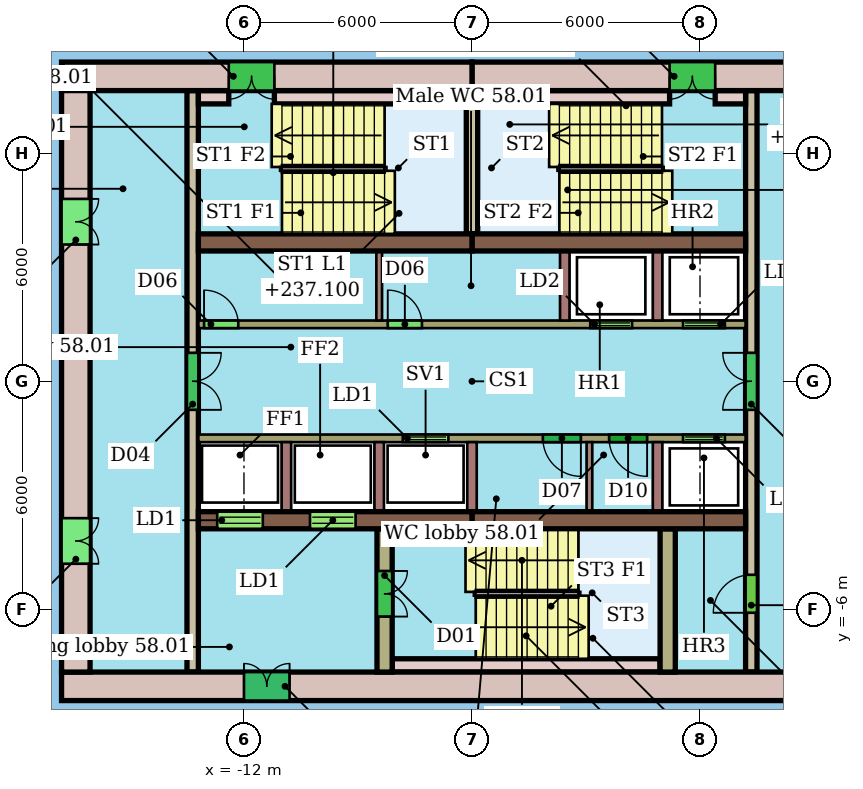
"""IFC4 building model, lengths in metres.
Left out: names, types, materials, properties, quantities, classifications, styles, units other than length and angle.
Written with IfcOpenShell. Run it as: python <this file> out.ifc"""

import sys

from ifc_helpers import new_model, si_unit, direction, frame, frame_2d, origin, place, context, subcontext, project, spatial, rectangle, extrude, element, fill, save


model = new_model("IFC4")
c1 = context("Model", 3, precision=1e-05, world=origin(), true_north=direction((0.0, 1.0)))
c2 = subcontext(c1, "Body", "Model", "MODEL_VIEW")
j1 = project(units=[si_unit("LENGTHUNIT", "METRE"), si_unit("PLANEANGLEUNIT", "RADIAN")], contexts=[c1])
p1 = place(None, origin())
s1 = spatial("IfcSite", under=j1, at=p1, CompositionType="ELEMENT")
p2 = place(p1, origin())
s2 = spatial("IfcBuilding", under=s1, at=p2, CompositionType="ELEMENT")
p3 = place(p2, frame((0.0, 0.0, 235.3)))
s3 = spatial("IfcBuildingStorey", under=s2, at=p3, CompositionType="ELEMENT", Elevation=235.3)
p4 = place(p3, frame((4.8, 8.025, 0.0), z_axis=(0.0, 0.0, 1.0), x_axis=(-1.0, 0.0, 0.0)))
e1 = element("IfcWall", 1, at=p4, inside=s3, PredefinedType="SHEAR", context=c2, shape_type="SweptSolid", body=[
    extrude(rectangle(XDim=10.8, YDim=0.75, at=frame_2d((5.4, 0.0))), origin(), (0.0, 0.0, 1.0), 3.3),
])
p5 = place(p4, frame((4.4, 0.0, 0.0)))
e2 = element("IfcOpeningElement", 2, at=p5, cuts=e1, PredefinedType="OPENING", context=c2, shape_type="SweptSolid", body=[
    extrude(rectangle(XDim=1.2, YDim=2.1, at=frame_2d((0.6, 1.05))), frame((0.0, 0.385, 0.0), z_axis=(0.0, -1.0, 0.0), x_axis=(1.0, 0.0, 0.0)), (0.0, 0.0, 1.0), 0.77),
])
p6 = place(p3, frame((-6.0, 8.025, 0.0), z_axis=(0.0, 0.0, 1.0), x_axis=(-1.0, 0.0, 0.0)))
e3 = element("IfcWall", 3, at=p6, inside=s3, PredefinedType="SHEAR", context=c2, shape_type="SweptSolid", body=[
    extrude(rectangle(XDim=10.8, YDim=0.75, at=frame_2d((5.4, 0.0))), origin(), (0.0, 0.0, 1.0), 3.3),
])
p7 = place(p6, frame((5.2, 0.0, 0.0)))
e4 = element("IfcOpeningElement", 4, at=p7, cuts=e3, PredefinedType="OPENING", context=c2, shape_type="SweptSolid", body=[
    extrude(rectangle(XDim=1.2, YDim=2.1, at=frame_2d((0.6, 1.05))), frame((0.0, 0.385, 0.0), z_axis=(0.0, -1.0, 0.0), x_axis=(1.0, 0.0, 0.0)), (0.0, 0.0, 1.0), 0.77),
])
p8 = place(p3, frame((-16.8, -8.025, 0.0), z_axis=(0.0, 0.0, 1.0), x_axis=(1.0, 0.0, 0.0)))
e5 = element("IfcWall", 5, at=p8, inside=s3, PredefinedType="SHEAR", context=c2, shape_type="SweptSolid", body=[
    extrude(rectangle(XDim=21.6, YDim=0.75, at=frame_2d((10.8, 0.0))), origin(), (0.0, 0.0, 1.0), 3.3),
])
p9 = place(p8, frame((4.8, 0.0, 0.0)))
e6 = element("IfcOpeningElement", 6, at=p9, cuts=e5, PredefinedType="OPENING", context=c2, shape_type="SweptSolid", body=[
    extrude(rectangle(XDim=1.2, YDim=2.1, at=frame_2d((0.6, 1.05))), frame((0.0, 0.385, 0.0), z_axis=(0.0, -1.0, 0.0), x_axis=(1.0, 0.0, 0.0)), (0.0, 0.0, 1.0), 0.77),
])
p10 = place(p3, frame((-16.425, 7.65, 0.0), z_axis=(0.0, 0.0, 1.0), x_axis=(0.0, -1.0, 0.0)))
e7 = element("IfcWall", 7, at=p10, inside=s3, PredefinedType="SHEAR", context=c2, shape_type="SweptSolid", body=[
    extrude(rectangle(XDim=15.3, YDim=0.75, at=frame_2d((7.65, 0.0))), origin(), (0.0, 0.0, 1.0), 3.3),
])
p11 = place(p10, frame((11.25, 0.0, 0.0)))
e8 = element("IfcOpeningElement", 8, at=p11, cuts=e7, PredefinedType="OPENING", context=c2, shape_type="SweptSolid", body=[
    extrude(rectangle(XDim=1.2, YDim=2.1, at=frame_2d((0.6, 1.05))), frame((0.0, 0.385, 0.0), z_axis=(0.0, -1.0, 0.0), x_axis=(1.0, 0.0, 0.0)), (0.0, 0.0, 1.0), 0.77),
])
p12 = place(p10, frame((2.85, 0.0, 0.0)))
e9 = element("IfcOpeningElement", 9, at=p12, cuts=e7, PredefinedType="OPENING", context=c2, shape_type="SweptSolid", body=[
    extrude(rectangle(XDim=1.2, YDim=2.1, at=frame_2d((0.6, 1.05))), frame((0.0, 0.385, 0.0), z_axis=(0.0, -1.0, 0.0), x_axis=(1.0, 0.0, 0.0)), (0.0, 0.0, 1.0), 0.77),
])
for number, where, z_axis, x_axis in (
    (10, (-13.2, 3.655, 0.0), (0.0, 0.0, 1.0), (1.0, 0.0, 0.0)),
    (11, (-6.0, 3.655, 0.0), (0.0, 0.0, 1.0), (1.0, 0.0, 0.0)),
):
    element("IfcWall", number, at=place(p3, frame(where, z_axis=z_axis, x_axis=x_axis)), inside=s3, PredefinedType="SHEAR", context=c2, shape_type="SweptSolid", body=[
        extrude(rectangle(XDim=7.2, YDim=0.45, at=frame_2d((3.6, 0.0))), origin(), (0.0, 0.0, 1.0), 3.3),
    ])
p13 = place(p3, frame((-13.2, -3.655, 0.0), z_axis=(0.0, 0.0, 1.0), x_axis=(1.0, 0.0, 0.0)))
e12 = element("IfcWall", 12, at=p13, inside=s3, PredefinedType="SHEAR", context=c2, shape_type="SweptSolid", body=[
    extrude(rectangle(XDim=7.2, YDim=0.45, at=frame_2d((3.6, 0.0))), origin(), (0.0, 0.0, 1.0), 3.3),
])
p14 = place(p13, frame((0.496, 0.0, 0.0)))
e13 = element("IfcOpeningElement", 13, at=p14, cuts=e12, PredefinedType="OPENING", context=c2, shape_type="SweptSolid", body=[
    extrude(rectangle(XDim=1.2, YDim=2.1, at=frame_2d((0.6, 1.05))), frame((0.0, 0.235, 0.0), z_axis=(0.0, -1.0, 0.0), x_axis=(1.0, 0.0, 0.0)), (0.0, 0.0, 1.0), 0.47),
])
p15 = place(p13, frame((2.938, 0.0, 0.0)))
e14 = element("IfcOpeningElement", 14, at=p15, cuts=e12, PredefinedType="OPENING", context=c2, shape_type="SweptSolid", body=[
    extrude(rectangle(XDim=1.2, YDim=2.1, at=frame_2d((0.6, 1.05))), frame((0.0, 0.235, 0.0), z_axis=(0.0, -1.0, 0.0), x_axis=(1.0, 0.0, 0.0)), (0.0, 0.0, 1.0), 0.47),
])
p16 = place(p3, frame((-6.0, -3.655, 0.0), z_axis=(0.0, 0.0, 1.0), x_axis=(1.0, 0.0, 0.0)))
e15 = element("IfcWall", 15, at=p16, inside=s3, PredefinedType="SHEAR", context=c2, shape_type="SweptSolid", body=[
    extrude(rectangle(XDim=7.2, YDim=0.45, at=frame_2d((3.6, 0.0))), origin(), (0.0, 0.0, 1.0), 3.3),
])
p17 = place(p3, frame((-13.35, 7.65, 0.0), z_axis=(0.0, 0.0, 1.0), x_axis=(0.0, -1.0, 0.0)))
e16 = element("IfcWall", 16, at=p17, inside=s3, PredefinedType="SHEAR", context=c2, shape_type="SweptSolid", body=[
    extrude(rectangle(XDim=15.3, YDim=0.3, at=frame_2d((7.65, 0.0))), origin(), (0.0, 0.0, 1.0), 3.3),
])
p18 = place(p17, frame((6.9, 0.0, 0.0)))
e17 = element("IfcOpeningElement", 17, at=p18, cuts=e16, PredefinedType="OPENING", context=c2, shape_type="SweptSolid", body=[
    extrude(rectangle(XDim=1.5, YDim=2.1, at=frame_2d((0.75, 1.05))), frame((0.0, 0.16, 0.0), z_axis=(0.0, -1.0, 0.0), x_axis=(1.0, 0.0, 0.0)), (0.0, 0.0, 1.0), 0.32),
])
p19 = place(p3, frame((1.35, -7.65, 0.0), z_axis=(0.0, 0.0, 1.0), x_axis=(0.0, 1.0, 0.0)))
e18 = element("IfcWall", 18, at=p19, inside=s3, PredefinedType="SHEAR", context=c2, shape_type="SweptSolid", body=[
    extrude(rectangle(XDim=15.3, YDim=0.3, at=frame_2d((7.65, 0.0))), origin(), (0.0, 0.0, 1.0), 3.3),
])
p20 = place(p19, frame((1.56, 0.0, 0.0)))
e19 = element("IfcOpeningElement", 19, at=p20, cuts=e18, PredefinedType="OPENING", context=c2, shape_type="SweptSolid", body=[
    extrude(rectangle(XDim=1.0, YDim=2.1, at=frame_2d((0.5, 1.05))), frame((0.0, 0.16, 0.0), z_axis=(0.0, -1.0, 0.0), x_axis=(1.0, 0.0, 0.0)), (0.0, 0.0, 1.0), 0.32),
])
p21 = place(p19, frame((6.9, 0.0, 0.0)))
e20 = element("IfcOpeningElement", 20, at=p21, cuts=e18, PredefinedType="OPENING", context=c2, shape_type="SweptSolid", body=[
    extrude(rectangle(XDim=1.5, YDim=2.1, at=frame_2d((0.75, 1.05))), frame((0.0, 0.16, 0.0), z_axis=(0.0, -1.0, 0.0), x_axis=(1.0, 0.0, 0.0)), (0.0, 0.0, 1.0), 0.32),
])
p22 = place(p3, frame((-13.2, 1.5, 0.0), z_axis=(0.0, 0.0, 1.0), x_axis=(1.0, 0.0, 0.0)))
e21 = element("IfcWall", 21, at=p22, inside=s3, PredefinedType="SHEAR", context=c2, shape_type="SweptSolid", body=[
    extrude(rectangle(XDim=14.4, YDim=0.2, at=frame_2d((7.2, 0.0))), origin(), (0.0, 0.0, 1.0), 3.3),
])
p23 = place(p22, frame((10.312, 0.0, 0.0)))
e22 = element("IfcOpeningElement", 22, at=p23, cuts=e21, PredefinedType="OPENING", context=c2, shape_type="SweptSolid", body=[
    extrude(rectangle(XDim=1.1, YDim=2.1, at=frame_2d((0.55, 1.05))), frame((0.0, 0.11, 0.0), z_axis=(0.0, -1.0, 0.0), x_axis=(1.0, 0.0, 0.0)), (0.0, 0.0, 1.0), 0.22),
])
p24 = place(p22, frame((12.754, 0.0, 0.0)))
e23 = element("IfcOpeningElement", 23, at=p24, cuts=e21, PredefinedType="OPENING", context=c2, shape_type="SweptSolid", body=[
    extrude(rectangle(XDim=1.1, YDim=2.1, at=frame_2d((0.55, 1.05))), frame((0.0, 0.11, 0.0), z_axis=(0.0, -1.0, 0.0), x_axis=(1.0, 0.0, 0.0)), (0.0, 0.0, 1.0), 0.22),
])
p25 = place(p22, frame((0.15, 0.0, 0.0)))
e24 = element("IfcOpeningElement", 24, at=p25, cuts=e21, PredefinedType="OPENING", context=c2, shape_type="SweptSolid", body=[
    extrude(rectangle(XDim=0.9, YDim=2.1, at=frame_2d((0.45, 1.05))), frame((0.0, 0.11, 0.0), z_axis=(0.0, -1.0, 0.0), x_axis=(1.0, 0.0, 0.0)), (0.0, 0.0, 1.0), 0.22),
])
p26 = place(p22, frame((4.983, 0.0, 0.0)))
e25 = element("IfcOpeningElement", 25, at=p26, cuts=e21, PredefinedType="OPENING", context=c2, shape_type="SweptSolid", body=[
    extrude(rectangle(XDim=0.9, YDim=2.1, at=frame_2d((0.45, 1.05))), frame((0.0, 0.11, 0.0), z_axis=(0.0, -1.0, 0.0), x_axis=(1.0, 0.0, 0.0)), (0.0, 0.0, 1.0), 0.22),
])
p27 = place(p3, frame((1.2, -1.5, 0.0), z_axis=(0.0, 0.0, 1.0), x_axis=(-1.0, 0.0, 0.0)))
e26 = element("IfcWall", 26, at=p27, inside=s3, PredefinedType="SHEAR", context=c2, shape_type="SweptSolid", body=[
    extrude(rectangle(XDim=14.4, YDim=0.2, at=frame_2d((7.2, 0.0))), origin(), (0.0, 0.0, 1.0), 3.3),
])
p28 = place(p27, frame((7.821, 0.0, 0.0)))
e27 = element("IfcOpeningElement", 27, at=p28, cuts=e26, PredefinedType="OPENING", context=c2, shape_type="SweptSolid", body=[
    extrude(rectangle(XDim=1.2, YDim=2.1, at=frame_2d((0.6, 1.05))), frame((0.0, 0.11, 0.0), z_axis=(0.0, -1.0, 0.0), x_axis=(1.0, 0.0, 0.0)), (0.0, 0.0, 1.0), 0.22),
])
p29 = place(p27, frame((0.546, 0.0, 0.0)))
e28 = element("IfcOpeningElement", 28, at=p29, cuts=e26, PredefinedType="OPENING", context=c2, shape_type="SweptSolid", body=[
    extrude(rectangle(XDim=1.1, YDim=2.1, at=frame_2d((0.55, 1.05))), frame((0.0, 0.11, 0.0), z_axis=(0.0, -1.0, 0.0), x_axis=(1.0, 0.0, 0.0)), (0.0, 0.0, 1.0), 0.22),
])
p30 = place(p27, frame((4.335, 0.0, 0.0)))
e29 = element("IfcOpeningElement", 29, at=p30, cuts=e26, PredefinedType="OPENING", context=c2, shape_type="SweptSolid", body=[
    extrude(rectangle(XDim=1.0, YDim=2.1, at=frame_2d((0.5, 1.05))), frame((0.0, 0.11, 0.0), z_axis=(0.0, -1.0, 0.0), x_axis=(1.0, 0.0, 0.0)), (0.0, 0.0, 1.0), 0.22),
])
p31 = place(p27, frame((2.592, 0.0, 0.0)))
e30 = element("IfcOpeningElement", 30, at=p31, cuts=e26, PredefinedType="OPENING", context=c2, shape_type="SweptSolid", body=[
    extrude(rectangle(XDim=1.0, YDim=2.1, at=frame_2d((0.5, 1.05))), frame((0.0, 0.11, 0.0), z_axis=(0.0, -1.0, 0.0), x_axis=(1.0, 0.0, 0.0)), (0.0, 0.0, 1.0), 0.22),
])
p32 = place(p3, frame((-8.3, -3.88, 0.0), z_axis=(0.0, 0.0, 1.0), x_axis=(0.0, -1.0, 0.0)))
e31 = element("IfcWall", 31, at=p32, inside=s3, PredefinedType="SHEAR", context=c2, shape_type="SweptSolid", body=[
    extrude(rectangle(XDim=3.77, YDim=0.4, at=frame_2d((1.885, 0.0))), origin(), (0.0, 0.0, 1.0), 3.3),
])
p33 = place(p32, frame((1.11, 0.0, 0.0)))
e32 = element("IfcOpeningElement", 32, at=p33, cuts=e31, PredefinedType="OPENING", context=c2, shape_type="SweptSolid", body=[
    extrude(rectangle(XDim=1.2, YDim=2.1, at=frame_2d((0.6, 1.05))), frame((0.0, 0.21, 0.0), z_axis=(0.0, -1.0, 0.0), x_axis=(1.0, 0.0, 0.0)), (0.0, 0.0, 1.0), 0.42),
])
p34 = place(p3, frame((-0.85, -3.88, 0.0), z_axis=(0.0, 0.0, 1.0), x_axis=(0.0, -1.0, 0.0)))
e33 = element("IfcWall", 33, at=p34, inside=s3, PredefinedType="SHEAR", context=c2, shape_type="SweptSolid", body=[
    extrude(rectangle(XDim=3.77, YDim=0.4, at=frame_2d((1.885, 0.0))), origin(), (0.0, 0.0, 1.0), 3.3),
])
p35 = place(p3, frame((-6.0, 3.88, 0.0), z_axis=(0.0, 0.0, 1.0), x_axis=(0.0, 1.0, 0.0)))
e34 = element("IfcWall", 34, at=p35, inside=s3, PredefinedType="SHEAR", context=c2, shape_type="SweptSolid", body=[
    extrude(rectangle(XDim=3.77, YDim=0.3, at=frame_2d((1.885, 0.0))), origin(), (0.0, 0.0, 1.0), 3.3),
])
p36 = place(p3, frame((-13.2, 7.475, 0.0), z_axis=(0.0, 0.0, 1.0), x_axis=(1.0, 0.0, 0.0)))
e35 = element("IfcWall", 35, at=p36, inside=s3, PredefinedType="SHEAR", context=c2, shape_type="SweptSolid", body=[
    extrude(rectangle(XDim=0.8, YDim=0.35, at=frame_2d((0.4, 0.0))), origin(), (0.0, 0.0, 1.0), 3.3),
])
for number, where, z_axis, x_axis in (
    (36, (-11.2, 7.475, 0.0), (0.0, 0.0, 1.0), (1.0, 0.0, 0.0)),
    (37, (-5.85, 7.475, 0.0), (0.0, 0.0, 1.0), (1.0, 0.0, 0.0)),
):
    element("IfcWall", number, at=place(p3, frame(where, z_axis=z_axis, x_axis=x_axis)), inside=s3, PredefinedType="SHEAR", context=c2, shape_type="SweptSolid", body=[
        extrude(rectangle(XDim=5.05, YDim=0.35, at=frame_2d((2.525, 0.0))), origin(), (0.0, 0.0, 1.0), 3.3),
    ])
p37 = place(p3, frame((0.4, 7.475, 0.0), z_axis=(0.0, 0.0, 1.0), x_axis=(1.0, 0.0, 0.0)))
e38 = element("IfcWall", 38, at=p37, inside=s3, PredefinedType="SHEAR", context=c2, shape_type="SweptSolid", body=[
    extrude(rectangle(XDim=0.8, YDim=0.35, at=frame_2d((0.4, 0.0))), origin(), (0.0, 0.0, 1.0), 3.3),
])
p38 = place(p3, frame((-8.1, -7.475, 0.0), z_axis=(0.0, 0.0, 1.0), x_axis=(1.0, 0.0, 0.0)))
e39 = element("IfcWall", 39, at=p38, inside=s3, PredefinedType="SHEAR", context=c2, shape_type="SweptSolid", body=[
    extrude(rectangle(XDim=7.05, YDim=0.35, at=frame_2d((3.525, 0.0))), origin(), (0.0, 0.0, 1.0), 3.3),
])
for number, where, z_axis, x_axis in (
    (40, (-3.558, 1.6, 0.0), (0.0, 0.0, 1.0), (0.0, 1.0, 0.0)),
    (41, (-1.117, 1.6, 0.0), (0.0, 0.0, 1.0), (0.0, 1.0, 0.0)),
):
    element("IfcWall", number, at=place(p3, frame(where, z_axis=z_axis, x_axis=x_axis)), inside=s3, PredefinedType="SHEAR", context=c2, shape_type="SweptSolid", body=[
        extrude(rectangle(XDim=1.83, YDim=0.25, at=frame_2d((0.915, 0.0))), origin(), (0.0, 0.0, 1.0), 3.3),
    ])
p39 = place(p3, frame((-8.442, 1.6, 0.0), z_axis=(0.0, 0.0, 1.0), x_axis=(0.0, 1.0, 0.0)))
e42 = element("IfcWall", 42, at=p39, inside=s3, PredefinedType="PARTITIONING", context=c2, shape_type="SweptSolid", body=[
    extrude(rectangle(XDim=1.83, YDim=0.15, at=frame_2d((0.915, 0.0))), origin(), (0.0, 0.0, 1.0), 3.3),
])
for number, where, z_axis, x_axis in (
    (43, (-10.883, -1.6, 0.0), (0.0, 0.0, 1.0), (0.0, -1.0, 0.0)),
    (44, (-8.442, -1.6, 0.0), (0.0, 0.0, 1.0), (0.0, -1.0, 0.0)),
    (45, (-6.0, -1.6, 0.0), (0.0, 0.0, 1.0), (0.0, -1.0, 0.0)),
    (46, (-1.117, -1.6, 0.0), (0.0, 0.0, 1.0), (0.0, -1.0, 0.0)),
):
    element("IfcWall", number, at=place(p3, frame(where, z_axis=z_axis, x_axis=x_axis)), inside=s3, PredefinedType="SHEAR", context=c2, shape_type="SweptSolid", body=[
        extrude(rectangle(XDim=1.83, YDim=0.25, at=frame_2d((0.915, 0.0))), origin(), (0.0, 0.0, 1.0), 3.3),
    ])
p40 = place(p3, frame((-2.91, -1.6, 0.0), z_axis=(0.0, 0.0, 1.0), x_axis=(0.0, -1.0, 0.0)))
e47 = element("IfcWall", 47, at=p40, inside=s3, PredefinedType="PARTITIONING", context=c2, shape_type="SweptSolid", body=[
    extrude(rectangle(XDim=1.83, YDim=0.15, at=frame_2d((0.915, 0.0))), origin(), (0.0, 0.0, 1.0), 3.3),
])
p41 = place(p5, origin())
e48 = element("IfcDoor", 48, at=p41, inside=s3, OperationType="DOUBLE_DOOR_SINGLE_SWING", PredefinedType="NOTDEFINED", context=c2, shape_type="SweptSolid", body=[
    extrude(rectangle(XDim=1.2, YDim=2.1, at=frame_2d((0.6, 1.05))), frame((0.0, 0.025, 0.0), z_axis=(0.0, -1.0, 0.0), x_axis=(1.0, 0.0, 0.0)), (0.0, 0.0, 1.0), 0.05),
])
fill(e2, e48)
p42 = place(p7, origin())
e49 = element("IfcDoor", 49, at=p42, inside=s3, OperationType="DOUBLE_DOOR_SINGLE_SWING", PredefinedType="NOTDEFINED", context=c2, shape_type="SweptSolid", body=[
    extrude(rectangle(XDim=1.2, YDim=2.1, at=frame_2d((0.6, 1.05))), frame((0.0, 0.025, 0.0), z_axis=(0.0, -1.0, 0.0), x_axis=(1.0, 0.0, 0.0)), (0.0, 0.0, 1.0), 0.05),
])
fill(e4, e49)
p43 = place(p9, origin())
e50 = element("IfcDoor", 50, at=p43, inside=s3, OperationType="DOUBLE_DOOR_SINGLE_SWING", PredefinedType="NOTDEFINED", context=c2, shape_type="SweptSolid", body=[
    extrude(rectangle(XDim=1.2, YDim=2.1, at=frame_2d((0.6, 1.05))), frame((0.0, 0.025, 0.0), z_axis=(0.0, -1.0, 0.0), x_axis=(1.0, 0.0, 0.0)), (0.0, 0.0, 1.0), 0.05),
])
fill(e6, e50)
p44 = place(p11, origin())
e51 = element("IfcDoor", 51, at=p44, inside=s3, OperationType="DOUBLE_DOOR_SINGLE_SWING", PredefinedType="NOTDEFINED", context=c2, shape_type="SweptSolid", body=[
    extrude(rectangle(XDim=1.2, YDim=2.1, at=frame_2d((0.6, 1.05))), frame((0.0, 0.025, 0.0), z_axis=(0.0, -1.0, 0.0), x_axis=(1.0, 0.0, 0.0)), (0.0, 0.0, 1.0), 0.05),
])
fill(e8, e51)
p45 = place(p12, origin())
e52 = element("IfcDoor", 52, at=p45, inside=s3, OperationType="DOUBLE_DOOR_SINGLE_SWING", PredefinedType="NOTDEFINED", context=c2, shape_type="SweptSolid", body=[
    extrude(rectangle(XDim=1.2, YDim=2.1, at=frame_2d((0.6, 1.05))), frame((0.0, 0.025, 0.0), z_axis=(0.0, -1.0, 0.0), x_axis=(1.0, 0.0, 0.0)), (0.0, 0.0, 1.0), 0.05),
])
fill(e9, e52)
p46 = place(p14, origin())
e53 = element("IfcDoor", 53, at=p46, inside=s3, OperationType="DOUBLE_DOOR_SLIDING", PredefinedType="NOTDEFINED", context=c2, shape_type="SweptSolid", body=[
    extrude(rectangle(XDim=1.2, YDim=2.1, at=frame_2d((0.6, 1.05))), frame((0.0, 0.025, 0.0), z_axis=(0.0, -1.0, 0.0), x_axis=(1.0, 0.0, 0.0)), (0.0, 0.0, 1.0), 0.05),
])
fill(e13, e53)
p47 = place(p15, origin())
e54 = element("IfcDoor", 54, at=p47, inside=s3, OperationType="DOUBLE_DOOR_SLIDING", PredefinedType="NOTDEFINED", context=c2, shape_type="SweptSolid", body=[
    extrude(rectangle(XDim=1.2, YDim=2.1, at=frame_2d((0.6, 1.05))), frame((0.0, 0.025, 0.0), z_axis=(0.0, -1.0, 0.0), x_axis=(1.0, 0.0, 0.0)), (0.0, 0.0, 1.0), 0.05),
])
fill(e14, e54)
p48 = place(p18, origin())
e55 = element("IfcDoor", 55, at=p48, inside=s3, OperationType="DOUBLE_DOOR_SINGLE_SWING", PredefinedType="NOTDEFINED", context=c2, shape_type="SweptSolid", body=[
    extrude(rectangle(XDim=1.5, YDim=2.1, at=frame_2d((0.75, 1.05))), frame((0.0, 0.025, 0.0), z_axis=(0.0, -1.0, 0.0), x_axis=(1.0, 0.0, 0.0)), (0.0, 0.0, 1.0), 0.05),
])
fill(e17, e55)
p49 = place(p20, origin())
e56 = element("IfcDoor", 56, at=p49, inside=s3, OperationType="SINGLE_SWING_LEFT", PredefinedType="NOTDEFINED", context=c2, shape_type="SweptSolid", body=[
    extrude(rectangle(XDim=1.0, YDim=2.1, at=frame_2d((0.5, 1.05))), frame((0.0, 0.025, 0.0), z_axis=(0.0, -1.0, 0.0), x_axis=(1.0, 0.0, 0.0)), (0.0, 0.0, 1.0), 0.05),
])
fill(e19, e56)
p50 = place(p21, origin())
e57 = element("IfcDoor", 57, at=p50, inside=s3, OperationType="DOUBLE_DOOR_SINGLE_SWING", PredefinedType="NOTDEFINED", context=c2, shape_type="SweptSolid", body=[
    extrude(rectangle(XDim=1.5, YDim=2.1, at=frame_2d((0.75, 1.05))), frame((0.0, 0.025, 0.0), z_axis=(0.0, -1.0, 0.0), x_axis=(1.0, 0.0, 0.0)), (0.0, 0.0, 1.0), 0.05),
])
fill(e20, e57)
p51 = place(p23, origin())
e58 = element("IfcDoor", 58, at=p51, inside=s3, OperationType="DOUBLE_DOOR_SLIDING", PredefinedType="NOTDEFINED", context=c2, shape_type="SweptSolid", body=[
    extrude(rectangle(XDim=1.1, YDim=2.1, at=frame_2d((0.55, 1.05))), frame((0.0, 0.025, 0.0), z_axis=(0.0, -1.0, 0.0), x_axis=(1.0, 0.0, 0.0)), (0.0, 0.0, 1.0), 0.05),
])
fill(e22, e58)
p52 = place(p24, origin())
e59 = element("IfcDoor", 59, at=p52, inside=s3, OperationType="DOUBLE_DOOR_SLIDING", PredefinedType="NOTDEFINED", context=c2, shape_type="SweptSolid", body=[
    extrude(rectangle(XDim=1.1, YDim=2.1, at=frame_2d((0.55, 1.05))), frame((0.0, 0.025, 0.0), z_axis=(0.0, -1.0, 0.0), x_axis=(1.0, 0.0, 0.0)), (0.0, 0.0, 1.0), 0.05),
])
fill(e23, e59)
p53 = place(p25, origin())
e60 = element("IfcDoor", 60, at=p53, inside=s3, OperationType="SINGLE_SWING_LEFT", PredefinedType="NOTDEFINED", context=c2, shape_type="SweptSolid", body=[
    extrude(rectangle(XDim=0.9, YDim=2.1, at=frame_2d((0.45, 1.05))), frame((0.0, 0.025, 0.0), z_axis=(0.0, -1.0, 0.0), x_axis=(1.0, 0.0, 0.0)), (0.0, 0.0, 1.0), 0.05),
])
fill(e24, e60)
p54 = place(p26, origin())
e61 = element("IfcDoor", 61, at=p54, inside=s3, OperationType="SINGLE_SWING_LEFT", PredefinedType="NOTDEFINED", context=c2, shape_type="SweptSolid", body=[
    extrude(rectangle(XDim=0.9, YDim=2.1, at=frame_2d((0.45, 1.05))), frame((0.0, 0.025, 0.0), z_axis=(0.0, -1.0, 0.0), x_axis=(1.0, 0.0, 0.0)), (0.0, 0.0, 1.0), 0.05),
])
fill(e25, e61)
p55 = place(p28, origin())
e62 = element("IfcDoor", 62, at=p55, inside=s3, OperationType="DOUBLE_DOOR_SLIDING", PredefinedType="NOTDEFINED", context=c2, shape_type="SweptSolid", body=[
    extrude(rectangle(XDim=1.2, YDim=2.1, at=frame_2d((0.6, 1.05))), frame((0.0, 0.025, 0.0), z_axis=(0.0, -1.0, 0.0), x_axis=(1.0, 0.0, 0.0)), (0.0, 0.0, 1.0), 0.05),
])
fill(e27, e62)
p56 = place(p29, origin())
e63 = element("IfcDoor", 63, at=p56, inside=s3, OperationType="DOUBLE_DOOR_SLIDING", PredefinedType="NOTDEFINED", context=c2, shape_type="SweptSolid", body=[
    extrude(rectangle(XDim=1.1, YDim=2.1, at=frame_2d((0.55, 1.05))), frame((0.0, 0.025, 0.0), z_axis=(0.0, -1.0, 0.0), x_axis=(1.0, 0.0, 0.0)), (0.0, 0.0, 1.0), 0.05),
])
fill(e28, e63)
p57 = place(p30, origin())
e64 = element("IfcDoor", 64, at=p57, inside=s3, OperationType="SINGLE_SWING_LEFT", PredefinedType="NOTDEFINED", context=c2, shape_type="SweptSolid", body=[
    extrude(rectangle(XDim=1.0, YDim=2.1, at=frame_2d((0.5, 1.05))), frame((0.0, 0.025, 0.0), z_axis=(0.0, -1.0, 0.0), x_axis=(1.0, 0.0, 0.0)), (0.0, 0.0, 1.0), 0.05),
])
fill(e29, e64)
p58 = place(p31, origin())
e65 = element("IfcDoor", 65, at=p58, inside=s3, OperationType="SINGLE_SWING_LEFT", PredefinedType="NOTDEFINED", context=c2, shape_type="SweptSolid", body=[
    extrude(rectangle(XDim=1.0, YDim=2.1, at=frame_2d((0.5, 1.05))), frame((0.0, 0.025, 0.0), z_axis=(0.0, -1.0, 0.0), x_axis=(1.0, 0.0, 0.0)), (0.0, 0.0, 1.0), 0.05),
])
fill(e30, e65)
p59 = place(p33, origin())
e66 = element("IfcDoor", 66, at=p59, inside=s3, OperationType="DOUBLE_DOOR_SINGLE_SWING", PredefinedType="NOTDEFINED", context=c2, shape_type="SweptSolid", body=[
    extrude(rectangle(XDim=1.2, YDim=2.1, at=frame_2d((0.6, 1.05))), frame((0.0, 0.025, 0.0), z_axis=(0.0, -1.0, 0.0), x_axis=(1.0, 0.0, 0.0)), (0.0, 0.0, 1.0), 0.05),
])
fill(e32, e66)
save(model, sys.argv[1])
